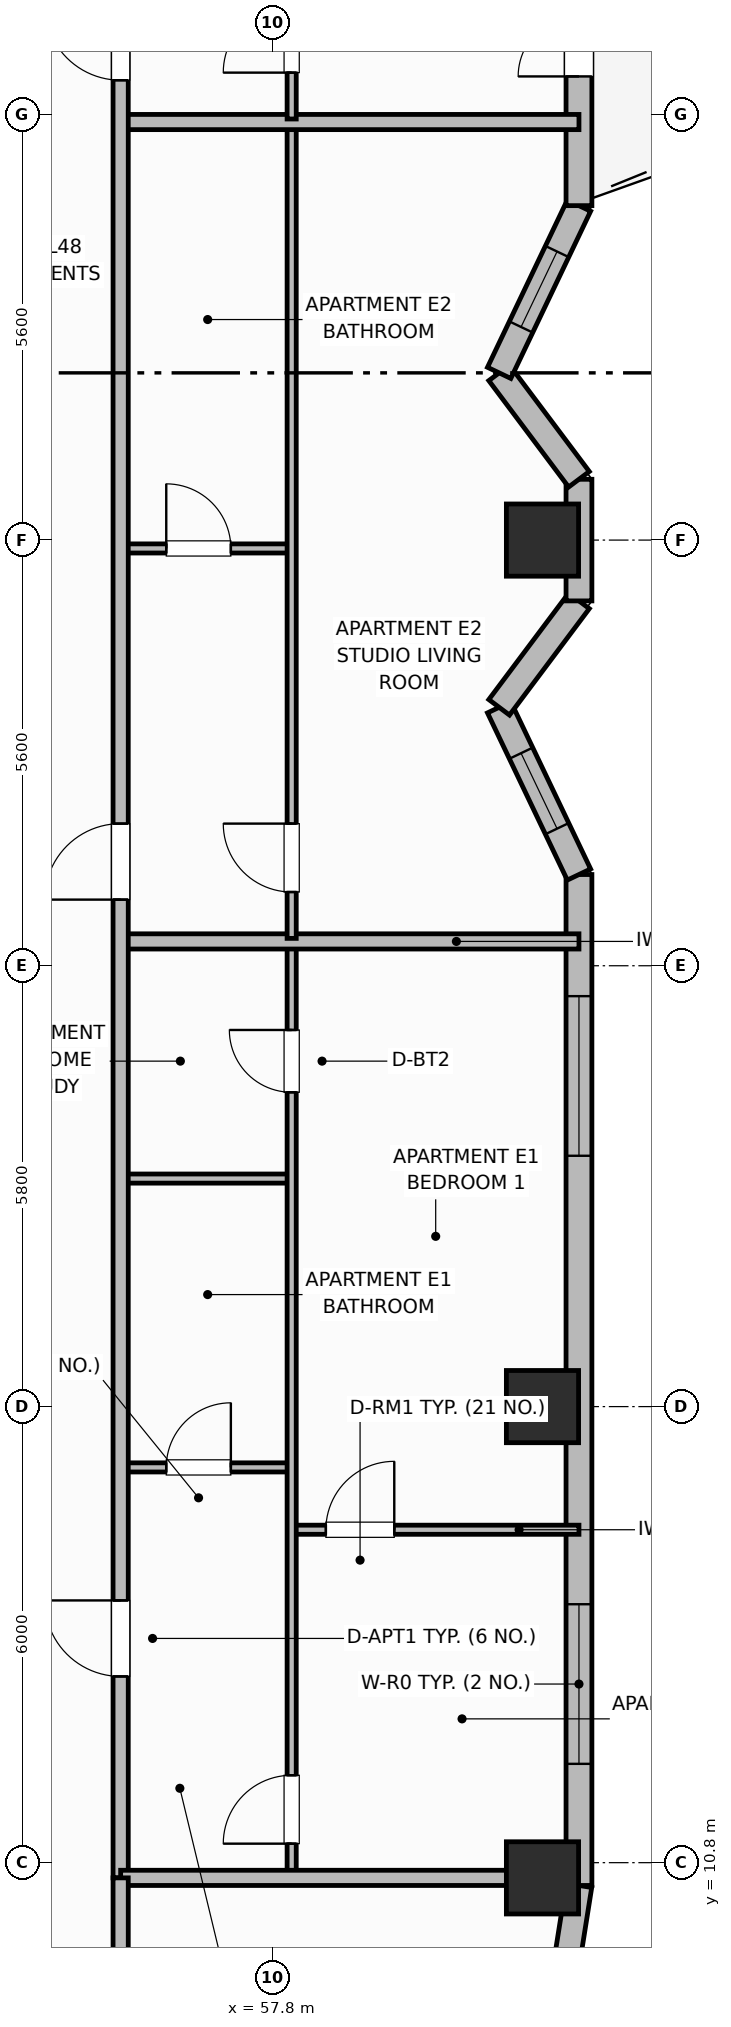
"""IFC4 building model, lengths in metres.
Left out: names, types, materials, properties, quantities, classifications, styles, units other than length and angle.
Written with IfcOpenShell. Run it as: python <this file> out.ifc"""

import sys

from ifc_helpers import new_model, si_unit, direction, frame, frame_2d, origin, origin_2d, place, context, subcontext, project, spatial, rectangle, extrude, element, fill, save


model = new_model("IFC4")
c1 = context("Model", 3, precision=1e-05, world=origin(), true_north=direction((0.0, 1.0)))
c2 = subcontext(c1, "Body", "Model", "MODEL_VIEW")
j1 = project(units=[si_unit("LENGTHUNIT", "METRE"), si_unit("PLANEANGLEUNIT", "RADIAN")], contexts=[c1])
p1 = place(None, origin())
s1 = spatial("IfcSite", under=j1, at=p1, CompositionType="ELEMENT")
p2 = place(p1, origin())
s2 = spatial("IfcBuilding", under=s1, at=p2, CompositionType="ELEMENT")
p3 = place(p2, frame((0.0, 0.0, 192.2)))
s3 = spatial("IfcBuildingStorey", under=s2, at=p3, CompositionType="ELEMENT", Elevation=192.2)
for number, where, z_axis, x_axis in (
    (1, (61.35, 10.6, 0.0), (0.0, 0.0, 1.0), (1.0, 0.0, 0.0)),
    (2, (61.35, 16.8, 0.0), (0.0, 0.0, 1.0), (1.0, 0.0, 0.0)),
    (3, (61.35, 28.2, 0.0), (0.0, 0.0, 1.0), (1.0, 0.0, 0.0)),
):
    element("IfcColumn", number, at=place(p3, frame(where, z_axis=z_axis, x_axis=x_axis)), inside=s3, PredefinedType="COLUMN", context=c2, shape_type="SweptSolid", body=[
        extrude(rectangle(XDim=0.95, YDim=0.95, at=origin_2d()), origin(), (0.0, 0.0, 1.0), 3.7),
    ])
p4 = place(p3, frame((61.652, 9.378, 0.0), z_axis=(0.0, 0.0, 1.0), x_axis=(0.156514556949, 0.987675651954, 0.0)))
e4 = element("IfcWall", 4, at=p4, inside=s3, PredefinedType="SOLIDWALL", context=c2, shape_type="SweptSolid", body=[
    extrude(rectangle(XDim=1.135, YDim=0.34, at=frame_2d((0.568, 0.0))), origin(), (0.0, 0.0, 1.0), 2.66),
])
p5 = place(p3, frame((61.83, 10.5, 0.0), z_axis=(0.0, 0.0, 1.0), x_axis=(0.0, 1.0, 0.0)))
e5 = element("IfcWall", 5, at=p5, inside=s3, PredefinedType="SOLIDWALL", context=c2, shape_type="SweptSolid", body=[
    extrude(rectangle(XDim=13.3, YDim=0.34, at=frame_2d((6.65, 0.0))), origin(), (0.0, 0.0, 1.0), 2.66),
])
p6 = place(p5, frame((1.6, 0.0, 0.64)))
e6 = element("IfcOpeningElement", 6, at=p6, cuts=e5, PredefinedType="OPENING", context=c2, shape_type="SweptSolid", body=[
    extrude(rectangle(XDim=2.1, YDim=1.9, at=frame_2d((1.05, 0.95))), frame((0.0, 0.18, 0.0), z_axis=(0.0, -1.0, 0.0), x_axis=(1.0, 0.0, 0.0)), (0.0, 0.0, 1.0), 0.36),
])
p7 = place(p5, frame((9.6, 0.0, 0.64)))
e7 = element("IfcOpeningElement", 7, at=p7, cuts=e5, PredefinedType="OPENING", context=c2, shape_type="SweptSolid", body=[
    extrude(rectangle(XDim=2.1, YDim=1.9, at=frame_2d((1.05, 0.95))), frame((0.0, 0.18, 0.0), z_axis=(0.0, -1.0, 0.0), x_axis=(1.0, 0.0, 0.0)), (0.0, 0.0, 1.0), 0.36),
])
p8 = place(p3, frame((61.83, 23.8, 0.0), z_axis=(0.0, 0.0, 1.0), x_axis=(-0.430753686581, 0.902469534941, 0.0)))
e8 = element("IfcWall", 8, at=p8, inside=s3, PredefinedType="SOLIDWALL", context=c2, shape_type="SweptSolid", body=[
    extrude(rectangle(XDim=2.438, YDim=0.34, at=frame_2d((1.219, 0.0))), origin(), (0.0, 0.0, 1.0), 2.66),
])
p9 = place(p8, frame((0.669, 0.0, 0.85)))
e9 = element("IfcOpeningElement", 9, at=p9, cuts=e8, PredefinedType="OPENING", context=c2, shape_type="SweptSolid", body=[
    extrude(rectangle(XDim=1.1, YDim=1.65, at=frame_2d((0.55, 0.825))), frame((0.0, 0.18, 0.0), z_axis=(0.0, -1.0, 0.0), x_axis=(1.0, 0.0, 0.0)), (0.0, 0.0, 1.0), 0.36),
])
p10 = place(p3, frame((60.78, 26.0, 0.0), z_axis=(0.0, 0.0, 1.0), x_axis=(0.600044643168, 0.799966515677, 0.0)))
e10 = element("IfcWall", 10, at=p10, inside=s3, PredefinedType="SOLIDWALL", context=c2, shape_type="SweptSolid", body=[
    extrude(rectangle(XDim=1.75, YDim=0.34, at=frame_2d((0.875, 0.0))), origin(), (0.0, 0.0, 1.0), 2.66),
])
p11 = place(p3, frame((61.83, 27.4, 0.0), z_axis=(0.0, 0.0, 1.0), x_axis=(0.0, 1.0, 0.0)))
e11 = element("IfcWall", 11, at=p11, inside=s3, PredefinedType="SOLIDWALL", context=c2, shape_type="SweptSolid", body=[
    extrude(rectangle(XDim=1.6, YDim=0.34, at=frame_2d((0.8, 0.0))), origin(), (0.0, 0.0, 1.0), 2.66),
])
p12 = place(p3, frame((61.83, 29.0, 0.0), z_axis=(0.0, 0.0, 1.0), x_axis=(-0.600044643168, 0.799966515677, 0.0)))
e12 = element("IfcWall", 12, at=p12, inside=s3, PredefinedType="SOLIDWALL", context=c2, shape_type="SweptSolid", body=[
    extrude(rectangle(XDim=1.75, YDim=0.34, at=frame_2d((0.875, 0.0))), origin(), (0.0, 0.0, 1.0), 2.66),
])
p13 = place(p3, frame((60.78, 30.4, 0.0), z_axis=(0.0, 0.0, 1.0), x_axis=(0.430714756408, 0.902488115496, 0.0)))
e13 = element("IfcWall", 13, at=p13, inside=s3, PredefinedType="SOLIDWALL", context=c2, shape_type="SweptSolid", body=[
    extrude(rectangle(XDim=2.438, YDim=0.34, at=frame_2d((1.219, 0.0))), origin(), (0.0, 0.0, 1.0), 2.66),
])
p14 = place(p13, frame((0.669, 0.0, 0.85)))
e14 = element("IfcOpeningElement", 14, at=p14, cuts=e13, PredefinedType="OPENING", context=c2, shape_type="SweptSolid", body=[
    extrude(rectangle(XDim=1.1, YDim=1.65, at=frame_2d((0.55, 0.825))), frame((0.0, 0.18, 0.0), z_axis=(0.0, -1.0, 0.0), x_axis=(1.0, 0.0, 0.0)), (0.0, 0.0, 1.0), 0.36),
])
p15 = place(p3, frame((61.83, 32.6, 0.0), z_axis=(0.0, 0.0, 1.0), x_axis=(0.0, 1.0, 0.0)))
e15 = element("IfcWall", 15, at=p15, inside=s3, PredefinedType="SOLIDWALL", context=c2, shape_type="SweptSolid", body=[
    extrude(rectangle(XDim=13.3, YDim=0.34, at=frame_2d((6.65, 0.0))), origin(), (0.0, 0.0, 1.0), 2.66),
])
p16 = place(p15, frame((1.7, 0.0, 0.0)))
e16 = element("IfcOpeningElement", 16, at=p16, cuts=e15, PredefinedType="OPENING", context=c2, shape_type="SweptSolid", body=[
    extrude(rectangle(XDim=1.6, YDim=2.1, at=frame_2d((0.8, 1.05))), frame((0.0, 0.18, 0.0), z_axis=(0.0, -1.0, 0.0), x_axis=(1.0, 0.0, 0.0)), (0.0, 0.0, 1.0), 0.36),
])
p17 = place(p15, frame((9.75, 0.0, 0.69)))
e17 = element("IfcOpeningElement", 17, at=p17, cuts=e15, PredefinedType="OPENING", context=c2, shape_type="SweptSolid", body=[
    extrude(rectangle(XDim=1.8, YDim=1.85, at=frame_2d((0.9, 0.925))), frame((0.0, 0.18, 0.0), z_axis=(0.0, -1.0, 0.0), x_axis=(1.0, 0.0, 0.0)), (0.0, 0.0, 1.0), 0.36),
])
p18 = place(p3, frame((55.8, 16.0, 0.0), z_axis=(0.0, 0.0, 1.0), x_axis=(1.0, 0.0, 0.0)))
e18 = element("IfcWall", 18, at=p18, inside=s3, PredefinedType="PARTITIONING", context=c2, shape_type="SweptSolid", body=[
    extrude(rectangle(XDim=2.25, YDim=0.12, at=frame_2d((1.125, 0.0))), origin(), (0.0, 0.0, 1.0), 2.49),
])
p19 = place(p18, frame((0.6, 0.0, 0.0)))
e19 = element("IfcOpeningElement", 19, at=p19, cuts=e18, PredefinedType="OPENING", context=c2, shape_type="SweptSolid", body=[
    extrude(rectangle(XDim=0.85, YDim=2.1, at=frame_2d((0.425, 1.05))), frame((0.0, 0.07, 0.0), z_axis=(0.0, -1.0, 0.0), x_axis=(1.0, 0.0, 0.0)), (0.0, 0.0, 1.0), 0.14),
])
p20 = place(p3, frame((55.8, 19.8, 0.0), z_axis=(0.0, 0.0, 1.0), x_axis=(1.0, 0.0, 0.0)))
e20 = element("IfcWall", 20, at=p20, inside=s3, PredefinedType="PARTITIONING", context=c2, shape_type="SweptSolid", body=[
    extrude(rectangle(XDim=2.25, YDim=0.12, at=frame_2d((1.125, 0.0))), origin(), (0.0, 0.0, 1.0), 2.49),
])
p21 = place(p3, frame((58.05, 15.18, 0.0), z_axis=(0.0, 0.0, 1.0), x_axis=(1.0, 0.0, 0.0)))
e21 = element("IfcWall", 21, at=p21, inside=s3, PredefinedType="PARTITIONING", context=c2, shape_type="SweptSolid", body=[
    extrude(rectangle(XDim=3.78, YDim=0.12, at=frame_2d((1.89, 0.0))), origin(), (0.0, 0.0, 1.0), 2.49),
])
p22 = place(p21, frame((0.45, 0.0, 0.0)))
e22 = element("IfcOpeningElement", 22, at=p22, cuts=e21, PredefinedType="OPENING", context=c2, shape_type="SweptSolid", body=[
    extrude(rectangle(XDim=0.9, YDim=2.1, at=frame_2d((0.45, 1.05))), frame((0.0, 0.07, 0.0), z_axis=(0.0, -1.0, 0.0), x_axis=(1.0, 0.0, 0.0)), (0.0, 0.0, 1.0), 0.14),
])
p23 = place(p3, frame((58.05, 10.64, 0.0), z_axis=(0.0, 0.0, 1.0), x_axis=(0.0, 1.0, 0.0)))
e23 = element("IfcWall", 23, at=p23, inside=s3, PredefinedType="PARTITIONING", context=c2, shape_type="SweptSolid", body=[
    extrude(rectangle(XDim=12.24, YDim=0.12, at=frame_2d((6.12, 0.0))), origin(), (0.0, 0.0, 1.0), 2.49),
])
p24 = place(p23, frame((0.41, 0.0, 0.0)))
e24 = element("IfcOpeningElement", 24, at=p24, cuts=e23, PredefinedType="OPENING", context=c2, shape_type="SweptSolid", body=[
    extrude(rectangle(XDim=0.9, YDim=2.1, at=frame_2d((0.45, 1.05))), frame((0.0, 0.07, 0.0), z_axis=(0.0, -1.0, 0.0), x_axis=(1.0, 0.0, 0.0)), (0.0, 0.0, 1.0), 0.14),
])
p25 = place(p23, frame((10.295, 0.0, 0.0)))
e25 = element("IfcOpeningElement", 25, at=p25, cuts=e23, PredefinedType="OPENING", context=c2, shape_type="SweptSolid", body=[
    extrude(rectangle(XDim=0.82, YDim=2.08, at=frame_2d((0.41, 1.04))), frame((0.0, 0.07, 0.0), z_axis=(0.0, -1.0, 0.0), x_axis=(1.0, 0.0, 0.0)), (0.0, 0.0, 1.0), 0.14),
])
p26 = place(p3, frame((55.8, 22.92, 0.0), z_axis=(0.0, 0.0, 1.0), x_axis=(1.0, 0.0, 0.0)))
e26 = element("IfcWall", 26, at=p26, inside=s3, PredefinedType="PARTITIONING", context=c2, shape_type="SweptSolid", body=[
    extrude(rectangle(XDim=6.03, YDim=0.2, at=frame_2d((3.015, 0.0))), origin(), (0.0, 0.0, 1.0), 2.49),
])
p27 = place(p3, frame((55.8, 28.09, 0.0), z_axis=(0.0, 0.0, 1.0), x_axis=(1.0, 0.0, 0.0)))
e27 = element("IfcWall", 27, at=p27, inside=s3, PredefinedType="PARTITIONING", context=c2, shape_type="SweptSolid", body=[
    extrude(rectangle(XDim=2.25, YDim=0.12, at=frame_2d((1.125, 0.0))), origin(), (0.0, 0.0, 1.0), 2.49),
])
p28 = place(p27, frame((0.6, 0.0, 0.0)))
e28 = element("IfcOpeningElement", 28, at=p28, cuts=e27, PredefinedType="OPENING", context=c2, shape_type="SweptSolid", body=[
    extrude(rectangle(XDim=0.85, YDim=2.1, at=frame_2d((0.425, 1.05))), frame((0.0, 0.07, 0.0), z_axis=(0.0, -1.0, 0.0), x_axis=(1.0, 0.0, 0.0)), (0.0, 0.0, 1.0), 0.14),
])
p29 = place(p3, frame((58.05, 22.96, 0.0), z_axis=(0.0, 0.0, 1.0), x_axis=(0.0, 1.0, 0.0)))
e29 = element("IfcWall", 29, at=p29, inside=s3, PredefinedType="PARTITIONING", context=c2, shape_type="SweptSolid", body=[
    extrude(rectangle(XDim=10.7, YDim=0.12, at=frame_2d((5.35, 0.0))), origin(), (0.0, 0.0, 1.0), 2.49),
])
p30 = place(p29, frame((0.61, 0.0, 0.0)))
e30 = element("IfcOpeningElement", 30, at=p30, cuts=e29, PredefinedType="OPENING", context=c2, shape_type="SweptSolid", body=[
    extrude(rectangle(XDim=0.9, YDim=2.1, at=frame_2d((0.45, 1.05))), frame((0.0, 0.07, 0.0), z_axis=(0.0, -1.0, 0.0), x_axis=(1.0, 0.0, 0.0)), (0.0, 0.0, 1.0), 0.14),
])
p31 = place(p3, frame((55.8, 33.7, 0.0), z_axis=(0.0, 0.0, 1.0), x_axis=(1.0, 0.0, 0.0)))
e31 = element("IfcWall", 31, at=p31, inside=s3, PredefinedType="PARTITIONING", context=c2, shape_type="SweptSolid", body=[
    extrude(rectangle(XDim=6.03, YDim=0.2, at=frame_2d((3.015, 0.0))), origin(), (0.0, 0.0, 1.0), 2.49),
])
p32 = place(p3, frame((58.05, 33.74, 0.0), z_axis=(0.0, 0.0, 1.0), x_axis=(0.0, 1.0, 0.0)))
e32 = element("IfcWall", 32, at=p32, inside=s3, PredefinedType="PARTITIONING", context=c2, shape_type="SweptSolid", body=[
    extrude(rectangle(XDim=12.02, YDim=0.12, at=frame_2d((6.01, 0.0))), origin(), (0.0, 0.0, 1.0), 2.49),
])
p33 = place(p32, frame((0.61, 0.0, 0.0)))
e33 = element("IfcOpeningElement", 33, at=p33, cuts=e32, PredefinedType="OPENING", context=c2, shape_type="SweptSolid", body=[
    extrude(rectangle(XDim=0.9, YDim=2.1, at=frame_2d((0.45, 1.05))), frame((0.0, 0.07, 0.0), z_axis=(0.0, -1.0, 0.0), x_axis=(1.0, 0.0, 0.0)), (0.0, 0.0, 1.0), 0.14),
])
p34 = place(p32, frame((10.185, 0.0, 0.0)))
e34 = element("IfcOpeningElement", 34, at=p34, cuts=e32, PredefinedType="OPENING", context=c2, shape_type="SweptSolid", body=[
    extrude(rectangle(XDim=0.82, YDim=2.08, at=frame_2d((0.41, 1.04))), frame((0.0, 0.07, 0.0), z_axis=(0.0, -1.0, 0.0), x_axis=(1.0, 0.0, 0.0)), (0.0, 0.0, 1.0), 0.14),
])
p35 = place(p3, frame((55.8, 10.6, 0.0), z_axis=(0.0, 0.0, 1.0), x_axis=(0.0, 1.0, 0.0)))
e35 = element("IfcWall", 35, at=p35, inside=s3, PredefinedType="PARTITIONING", context=c2, shape_type="SweptSolid", body=[
    extrude(rectangle(XDim=35.2, YDim=0.2, at=frame_2d((17.6, 0.0))), origin(), (0.0, 0.0, 1.0), 2.49),
])
p36 = place(p35, frame((2.65, 0.0, 0.0)))
e36 = element("IfcOpeningElement", 36, at=p36, cuts=e35, PredefinedType="OPENING", context=c2, shape_type="SweptSolid", body=[
    extrude(rectangle(XDim=1.0, YDim=2.15, at=frame_2d((0.5, 1.075))), frame((0.0, 0.11, 0.0), z_axis=(0.0, -1.0, 0.0), x_axis=(1.0, 0.0, 0.0)), (0.0, 0.0, 1.0), 0.22),
])
p37 = place(p35, frame((12.87, 0.0, 0.0)))
e37 = element("IfcOpeningElement", 37, at=p37, cuts=e35, PredefinedType="OPENING", context=c2, shape_type="SweptSolid", body=[
    extrude(rectangle(XDim=1.0, YDim=2.15, at=frame_2d((0.5, 1.075))), frame((0.0, 0.11, 0.0), z_axis=(0.0, -1.0, 0.0), x_axis=(1.0, 0.0, 0.0)), (0.0, 0.0, 1.0), 0.22),
])
p38 = place(p35, frame((23.65, 0.0, 0.0)))
e38 = element("IfcOpeningElement", 38, at=p38, cuts=e35, PredefinedType="OPENING", context=c2, shape_type="SweptSolid", body=[
    extrude(rectangle(XDim=1.0, YDim=2.15, at=frame_2d((0.5, 1.075))), frame((0.0, 0.11, 0.0), z_axis=(0.0, -1.0, 0.0), x_axis=(1.0, 0.0, 0.0)), (0.0, 0.0, 1.0), 0.22),
])
p39 = place(p3, frame((55.8, 10.6, 0.0), z_axis=(0.0, 0.0, 1.0), x_axis=(1.0, 0.0, 0.0)))
e39 = element("IfcWall", 39, at=p39, inside=s3, PredefinedType="PARTITIONING", context=c2, shape_type="SweptSolid", body=[
    extrude(rectangle(XDim=5.61, YDim=0.2, at=frame_2d((2.805, 0.0))), origin(), (0.0, 0.0, 1.0), 2.49),
])
p40 = place(p3, frame((55.8, 6.87, 0.0), z_axis=(0.0, 0.0, 1.0), x_axis=(0.0, 1.0, 0.0)))
e40 = element("IfcWall", 40, at=p40, inside=s3, PredefinedType="PARTITIONING", context=c2, shape_type="SweptSolid", body=[
    extrude(rectangle(XDim=3.73, YDim=0.2, at=frame_2d((1.865, 0.0))), origin(), (0.0, 0.0, 1.0), 2.49),
])
p41 = place(p6, origin())
e41 = element("IfcWindow", 41, at=p41, inside=s3, PartitioningType="SINGLE_PANEL", PredefinedType="WINDOW", context=c2, shape_type="SweptSolid", body=[
    extrude(rectangle(XDim=2.1, YDim=1.9, at=frame_2d((1.05, 0.95))), frame((0.0, 0.03, 0.0), z_axis=(0.0, -1.0, 0.0), x_axis=(1.0, 0.0, 0.0)), (0.0, 0.0, 1.0), 0.06),
])
fill(e6, e41)
p42 = place(p7, origin())
e42 = element("IfcWindow", 42, at=p42, inside=s3, PartitioningType="SINGLE_PANEL", PredefinedType="WINDOW", context=c2, shape_type="SweptSolid", body=[
    extrude(rectangle(XDim=2.1, YDim=1.9, at=frame_2d((1.05, 0.95))), frame((0.0, 0.03, 0.0), z_axis=(0.0, -1.0, 0.0), x_axis=(1.0, 0.0, 0.0)), (0.0, 0.0, 1.0), 0.06),
])
fill(e7, e42)
p43 = place(p9, origin())
e43 = element("IfcWindow", 43, at=p43, inside=s3, PartitioningType="SINGLE_PANEL", PredefinedType="WINDOW", context=c2, shape_type="SweptSolid", body=[
    extrude(rectangle(XDim=1.1, YDim=1.65, at=frame_2d((0.55, 0.825))), frame((0.0, 0.03, 0.0), z_axis=(0.0, -1.0, 0.0), x_axis=(1.0, 0.0, 0.0)), (0.0, 0.0, 1.0), 0.06),
])
fill(e9, e43)
p44 = place(p14, origin())
e44 = element("IfcWindow", 44, at=p44, inside=s3, PartitioningType="SINGLE_PANEL", PredefinedType="WINDOW", context=c2, shape_type="SweptSolid", body=[
    extrude(rectangle(XDim=1.1, YDim=1.65, at=frame_2d((0.55, 0.825))), frame((0.0, 0.03, 0.0), z_axis=(0.0, -1.0, 0.0), x_axis=(1.0, 0.0, 0.0)), (0.0, 0.0, 1.0), 0.06),
])
fill(e14, e44)
p45 = place(p16, origin())
e45 = element("IfcDoor", 45, at=p45, inside=s3, OperationType="DOUBLE_DOOR_SINGLE_SWING", PredefinedType="DOOR", context=c2, shape_type="SweptSolid", body=[
    extrude(rectangle(XDim=1.6, YDim=2.1, at=frame_2d((0.8, 1.05))), frame((0.0, 0.025, 0.0), z_axis=(0.0, -1.0, 0.0), x_axis=(1.0, 0.0, 0.0)), (0.0, 0.0, 1.0), 0.05),
])
fill(e16, e45)
p46 = place(p19, origin())
e46 = element("IfcDoor", 46, at=p46, inside=s3, OperationType="SINGLE_SWING_RIGHT", PredefinedType="DOOR", context=c2, shape_type="SweptSolid", body=[
    extrude(rectangle(XDim=0.85, YDim=2.1, at=frame_2d((0.425, 1.05))), frame((0.0, 0.025, 0.0), z_axis=(0.0, -1.0, 0.0), x_axis=(1.0, 0.0, 0.0)), (0.0, 0.0, 1.0), 0.05),
])
fill(e19, e46)
p47 = place(p22, origin())
e47 = element("IfcDoor", 47, at=p47, inside=s3, OperationType="SINGLE_SWING_RIGHT", PredefinedType="DOOR", context=c2, shape_type="SweptSolid", body=[
    extrude(rectangle(XDim=0.9, YDim=2.1, at=frame_2d((0.45, 1.05))), frame((0.0, 0.025, 0.0), z_axis=(0.0, -1.0, 0.0), x_axis=(1.0, 0.0, 0.0)), (0.0, 0.0, 1.0), 0.05),
])
fill(e22, e47)
p48 = place(p24, origin())
e48 = element("IfcDoor", 48, at=p48, inside=s3, OperationType="SINGLE_SWING_LEFT", PredefinedType="DOOR", context=c2, shape_type="SweptSolid", body=[
    extrude(rectangle(XDim=0.9, YDim=2.1, at=frame_2d((0.45, 1.05))), frame((0.0, 0.025, 0.0), z_axis=(0.0, -1.0, 0.0), x_axis=(1.0, 0.0, 0.0)), (0.0, 0.0, 1.0), 0.05),
])
fill(e24, e48)
p49 = place(p25, origin())
e49 = element("IfcDoor", 49, at=p49, inside=s3, OperationType="SINGLE_SWING_RIGHT", PredefinedType="DOOR", context=c2, shape_type="SweptSolid", body=[
    extrude(rectangle(XDim=0.82, YDim=2.08, at=frame_2d((0.41, 1.04))), frame((0.0, 0.025, 0.0), z_axis=(0.0, -1.0, 0.0), x_axis=(1.0, 0.0, 0.0)), (0.0, 0.0, 1.0), 0.05),
])
fill(e25, e49)
p50 = place(p28, origin())
e50 = element("IfcDoor", 50, at=p50, inside=s3, OperationType="SINGLE_SWING_LEFT", PredefinedType="DOOR", context=c2, shape_type="SweptSolid", body=[
    extrude(rectangle(XDim=0.85, YDim=2.1, at=frame_2d((0.425, 1.05))), frame((0.0, 0.025, 0.0), z_axis=(0.0, -1.0, 0.0), x_axis=(1.0, 0.0, 0.0)), (0.0, 0.0, 1.0), 0.05),
])
fill(e28, e50)
p51 = place(p30, origin())
e51 = element("IfcDoor", 51, at=p51, inside=s3, OperationType="SINGLE_SWING_RIGHT", PredefinedType="DOOR", context=c2, shape_type="SweptSolid", body=[
    extrude(rectangle(XDim=0.9, YDim=2.1, at=frame_2d((0.45, 1.05))), frame((0.0, 0.025, 0.0), z_axis=(0.0, -1.0, 0.0), x_axis=(1.0, 0.0, 0.0)), (0.0, 0.0, 1.0), 0.05),
])
fill(e30, e51)
p52 = place(p33, origin())
e52 = element("IfcDoor", 52, at=p52, inside=s3, OperationType="SINGLE_SWING_LEFT", PredefinedType="DOOR", context=c2, shape_type="SweptSolid", body=[
    extrude(rectangle(XDim=0.9, YDim=2.1, at=frame_2d((0.45, 1.05))), frame((0.0, 0.025, 0.0), z_axis=(0.0, -1.0, 0.0), x_axis=(1.0, 0.0, 0.0)), (0.0, 0.0, 1.0), 0.05),
])
fill(e33, e52)
p53 = place(p36, origin())
e53 = element("IfcDoor", 53, at=p53, inside=s3, OperationType="SINGLE_SWING_RIGHT", PredefinedType="DOOR", context=c2, shape_type="SweptSolid", body=[
    extrude(rectangle(XDim=1.0, YDim=2.15, at=frame_2d((0.5, 1.075))), frame((0.0, 0.025, 0.0), z_axis=(0.0, -1.0, 0.0), x_axis=(1.0, 0.0, 0.0)), (0.0, 0.0, 1.0), 0.05),
])
fill(e36, e53)
p54 = place(p37, origin())
e54 = element("IfcDoor", 54, at=p54, inside=s3, OperationType="SINGLE_SWING_LEFT", PredefinedType="DOOR", context=c2, shape_type="SweptSolid", body=[
    extrude(rectangle(XDim=1.0, YDim=2.15, at=frame_2d((0.5, 1.075))), frame((0.0, 0.025, 0.0), z_axis=(0.0, -1.0, 0.0), x_axis=(1.0, 0.0, 0.0)), (0.0, 0.0, 1.0), 0.05),
])
fill(e37, e54)
p55 = place(p38, origin())
e55 = element("IfcDoor", 55, at=p55, inside=s3, OperationType="SINGLE_SWING_RIGHT", PredefinedType="DOOR", context=c2, shape_type="SweptSolid", body=[
    extrude(rectangle(XDim=1.0, YDim=2.15, at=frame_2d((0.5, 1.075))), frame((0.0, 0.025, 0.0), z_axis=(0.0, -1.0, 0.0), x_axis=(1.0, 0.0, 0.0)), (0.0, 0.0, 1.0), 0.05),
])
fill(e38, e55)
save(model, sys.argv[1])
